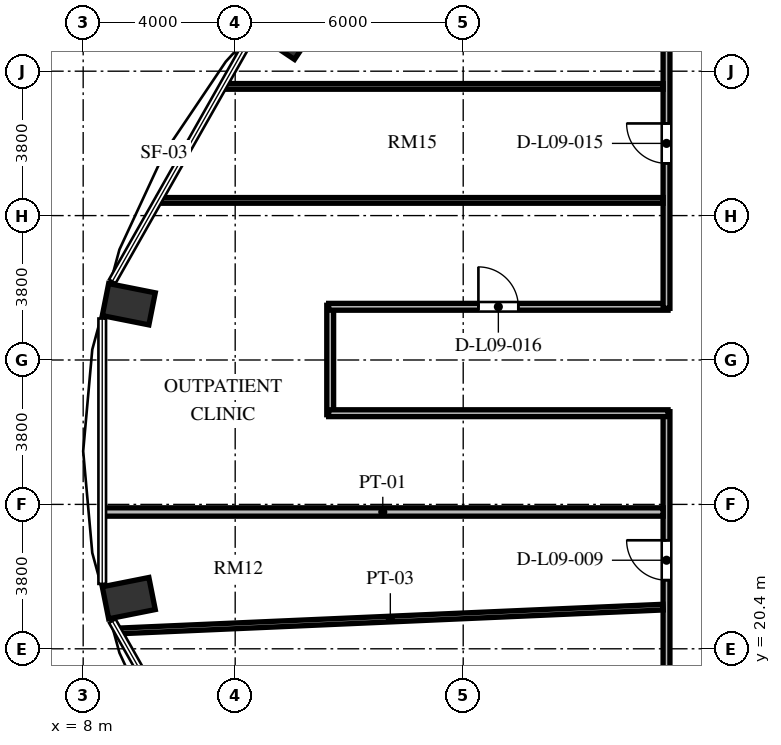
"""IFC4 building model, lengths in metres.
Left out: names, types, materials, properties, quantities, classifications, styles, units other than length and angle.
Written with IfcOpenShell. Run it as: python <this file> out.ifc"""

import sys

from ifc_helpers import new_model, si_unit, direction, frame, frame_2d, origin, origin_2d, place, context, subcontext, project, spatial, rectangle, extrude, element, fill, save


model = new_model("IFC4")
c1 = context("Model", 3, precision=1e-05, world=origin(), true_north=direction((0.0, 1.0)))
c2 = subcontext(c1, "Body", "Model", "MODEL_VIEW")
j1 = project(units=[si_unit("LENGTHUNIT", "METRE"), si_unit("PLANEANGLEUNIT", "RADIAN")], contexts=[c1])
p1 = place(None, origin())
s1 = spatial("IfcSite", under=j1, at=p1, CompositionType="ELEMENT")
p2 = place(p1, origin())
s2 = spatial("IfcBuilding", under=s1, at=p2, CompositionType="ELEMENT")
p3 = place(p2, frame((0.0, 0.0, 39.792)))
s3 = spatial("IfcBuildingStorey", under=s2, at=p3, CompositionType="ELEMENT", Elevation=39.792)
for number, where, z_axis, x_axis in (
    (1, (13.28, 36.614, 0.0), (0.0, 0.0, 1.0), (-0.831, 0.556, 0.0)),
    (2, (9.2, 29.468, 0.0), (0.0, 0.0, 1.0), (-0.981, 0.195, 0.0)),
    (3, (9.2, 21.732, 0.0), (0.0, 0.0, 1.0), (-0.981, -0.195, 0.0)),
):
    element("IfcColumn", number, at=place(p3, frame(where, z_axis=z_axis, x_axis=x_axis)), inside=s3, PredefinedType="COLUMN", context=c2, shape_type="SweptSolid", body=[
        extrude(rectangle(XDim=1.25, YDim=0.86, at=origin_2d()), origin(), (0.0, 0.0, 1.0), 3.648),
    ])
p4 = place(p3, frame((14.5, 26.56, 0.0), z_axis=(0.0, 0.0, 1.0), x_axis=(0.0, 1.0, 0.0)))
e4 = element("IfcWall", 4, at=p4, inside=s3, PredefinedType="PARTITIONING", context=c2, shape_type="SweptSolid", body=[
    extrude(rectangle(XDim=2.88, YDim=0.18, at=frame_2d((1.44, 0.0))), origin(), (0.0, 0.0, 1.0), 3.428),
])
p5 = place(p3, frame((14.46, 29.4, 0.0), z_axis=(0.0, 0.0, 1.0), x_axis=(1.0, 0.0, 0.0)))
e5 = element("IfcWall", 5, at=p5, inside=s3, PredefinedType="PARTITIONING", context=c2, shape_type="SweptSolid", body=[
    extrude(rectangle(XDim=8.93, YDim=0.18, at=frame_2d((4.465, 0.0))), origin(), (0.0, 0.0, 1.0), 3.428),
])
p6 = place(p5, frame((3.94, 0.0, 0.0)))
e6 = element("IfcOpeningElement", 6, at=p6, cuts=e5, PredefinedType="OPENING", context=c2, shape_type="SweptSolid", body=[
    extrude(rectangle(XDim=1.05, YDim=2.15, at=frame_2d((0.525, 1.075))), frame((0.0, 0.1, 0.0), z_axis=(0.0, -1.0, 0.0), x_axis=(1.0, 0.0, 0.0)), (0.0, 0.0, 1.0), 0.2),
])
p7 = place(p3, frame((23.35, 29.36, 0.0), z_axis=(0.0, 0.0, 1.0), x_axis=(0.0, 1.0, 0.0)))
e7 = element("IfcWall", 7, at=p7, inside=s3, PredefinedType="PARTITIONING", context=c2, shape_type="SweptSolid", body=[
    extrude(rectangle(XDim=9.43, YDim=0.18, at=frame_2d((4.715, 0.0))), origin(), (0.0, 0.0, 1.0), 3.428),
])
p8 = place(p7, frame((3.815, 0.0, 0.0)))
e8 = element("IfcOpeningElement", 8, at=p8, cuts=e7, PredefinedType="OPENING", context=c2, shape_type="SweptSolid", body=[
    extrude(rectangle(XDim=1.05, YDim=2.15, at=frame_2d((0.525, 1.075))), frame((0.0, 0.1, 0.0), z_axis=(0.0, -1.0, 0.0), x_axis=(1.0, 0.0, 0.0)), (0.0, 0.0, 1.0), 0.2),
])
p9 = place(p3, frame((23.35, 17.36, 0.0), z_axis=(0.0, 0.0, 1.0), x_axis=(0.0, 1.0, 0.0)))
e9 = element("IfcWall", 9, at=p9, inside=s3, PredefinedType="PARTITIONING", context=c2, shape_type="SweptSolid", body=[
    extrude(rectangle(XDim=9.28, YDim=0.18, at=frame_2d((4.64, 0.0))), origin(), (0.0, 0.0, 1.0), 3.428),
])
p10 = place(p9, frame((4.846, 0.0, 0.0)))
e10 = element("IfcOpeningElement", 10, at=p10, cuts=e9, PredefinedType="OPENING", context=c2, shape_type="SweptSolid", body=[
    extrude(rectangle(XDim=1.05, YDim=2.15, at=frame_2d((0.525, 1.075))), frame((0.0, 0.1, 0.0), z_axis=(0.0, -1.0, 0.0), x_axis=(1.0, 0.0, 0.0)), (0.0, 0.0, 1.0), 0.2),
])
p11 = place(p3, frame((23.39, 26.6, 0.0), z_axis=(0.0, 0.0, 1.0), x_axis=(-1.0, 0.0, 0.0)))
e11 = element("IfcWall", 11, at=p11, inside=s3, PredefinedType="PARTITIONING", context=c2, shape_type="SweptSolid", body=[
    extrude(rectangle(XDim=8.93, YDim=0.18, at=frame_2d((4.465, 0.0))), origin(), (0.0, 0.0, 1.0), 3.428),
])
p12 = place(p3, frame((8.905, 20.868, 0.0), z_axis=(0.0, 0.0, 1.0), x_axis=(0.999043936959, 0.043717411007, 0.0)))
e12 = element("IfcWall", 12, at=p12, inside=s3, PredefinedType="PARTITIONING", context=c2, shape_type="SweptSolid", body=[
    extrude(rectangle(XDim=14.369, YDim=0.15, at=frame_2d((7.185, 0.0))), origin(), (0.0, 0.0, 1.0), 2.813),
])
p13 = place(p3, frame((8.508, 24.0, 0.0), z_axis=(0.0, 0.0, 1.0), x_axis=(1.0, 0.0, 0.0)))
e13 = element("IfcWall", 13, at=p13, inside=s3, PredefinedType="PARTITIONING", context=c2, shape_type="SweptSolid", body=[
    extrude(rectangle(XDim=14.752, YDim=0.22, at=frame_2d((7.376, 0.0))), origin(), (0.0, 0.0, 1.0), 3.428),
])
p14 = place(p3, frame((9.978, 32.2, 0.0), z_axis=(0.0, 0.0, 1.0), x_axis=(1.0, 0.0, 0.0)))
e14 = element("IfcWall", 14, at=p14, inside=s3, PredefinedType="PARTITIONING", context=c2, shape_type="SweptSolid", body=[
    extrude(rectangle(XDim=13.282, YDim=0.15, at=frame_2d((6.641, 0.0))), origin(), (0.0, 0.0, 1.0), 3.428),
])
p15 = place(p3, frame((11.677, 35.2, 0.0), z_axis=(0.0, 0.0, 1.0), x_axis=(1.0, 0.0, 0.0)))
e15 = element("IfcWall", 15, at=p15, inside=s3, PredefinedType="PARTITIONING", context=c2, shape_type="SweptSolid", body=[
    extrude(rectangle(XDim=11.583, YDim=0.15, at=frame_2d((5.791, 0.0))), origin(), (0.0, 0.0, 1.0), 3.428),
])
p16 = place(p10, origin())
e16 = element("IfcDoor", 16, at=p16, inside=s3, OperationType="SINGLE_SWING_RIGHT", PredefinedType="DOOR", context=c2, shape_type="SweptSolid", body=[
    extrude(rectangle(XDim=1.05, YDim=2.15, at=frame_2d((0.525, 1.075))), frame((0.0, 0.025, 0.0), z_axis=(0.0, -1.0, 0.0), x_axis=(1.0, 0.0, 0.0)), (0.0, 0.0, 1.0), 0.05),
])
fill(e10, e16)
p17 = place(p8, origin())
e17 = element("IfcDoor", 17, at=p17, inside=s3, OperationType="SINGLE_SWING_RIGHT", PredefinedType="DOOR", context=c2, shape_type="SweptSolid", body=[
    extrude(rectangle(XDim=1.05, YDim=2.15, at=frame_2d((0.525, 1.075))), frame((0.0, 0.025, 0.0), z_axis=(0.0, -1.0, 0.0), x_axis=(1.0, 0.0, 0.0)), (0.0, 0.0, 1.0), 0.05),
])
fill(e8, e17)
p18 = place(p6, origin())
e18 = element("IfcDoor", 18, at=p18, inside=s3, OperationType="SINGLE_SWING_LEFT", PredefinedType="DOOR", context=c2, shape_type="SweptSolid", body=[
    extrude(rectangle(XDim=1.05, YDim=2.15, at=frame_2d((0.525, 1.075))), frame((0.0, 0.025, 0.0), z_axis=(0.0, -1.0, 0.0), x_axis=(1.0, 0.0, 0.0)), (0.0, 0.0, 1.0), 0.05),
])
fill(e6, e18)
save(model, sys.argv[1])
